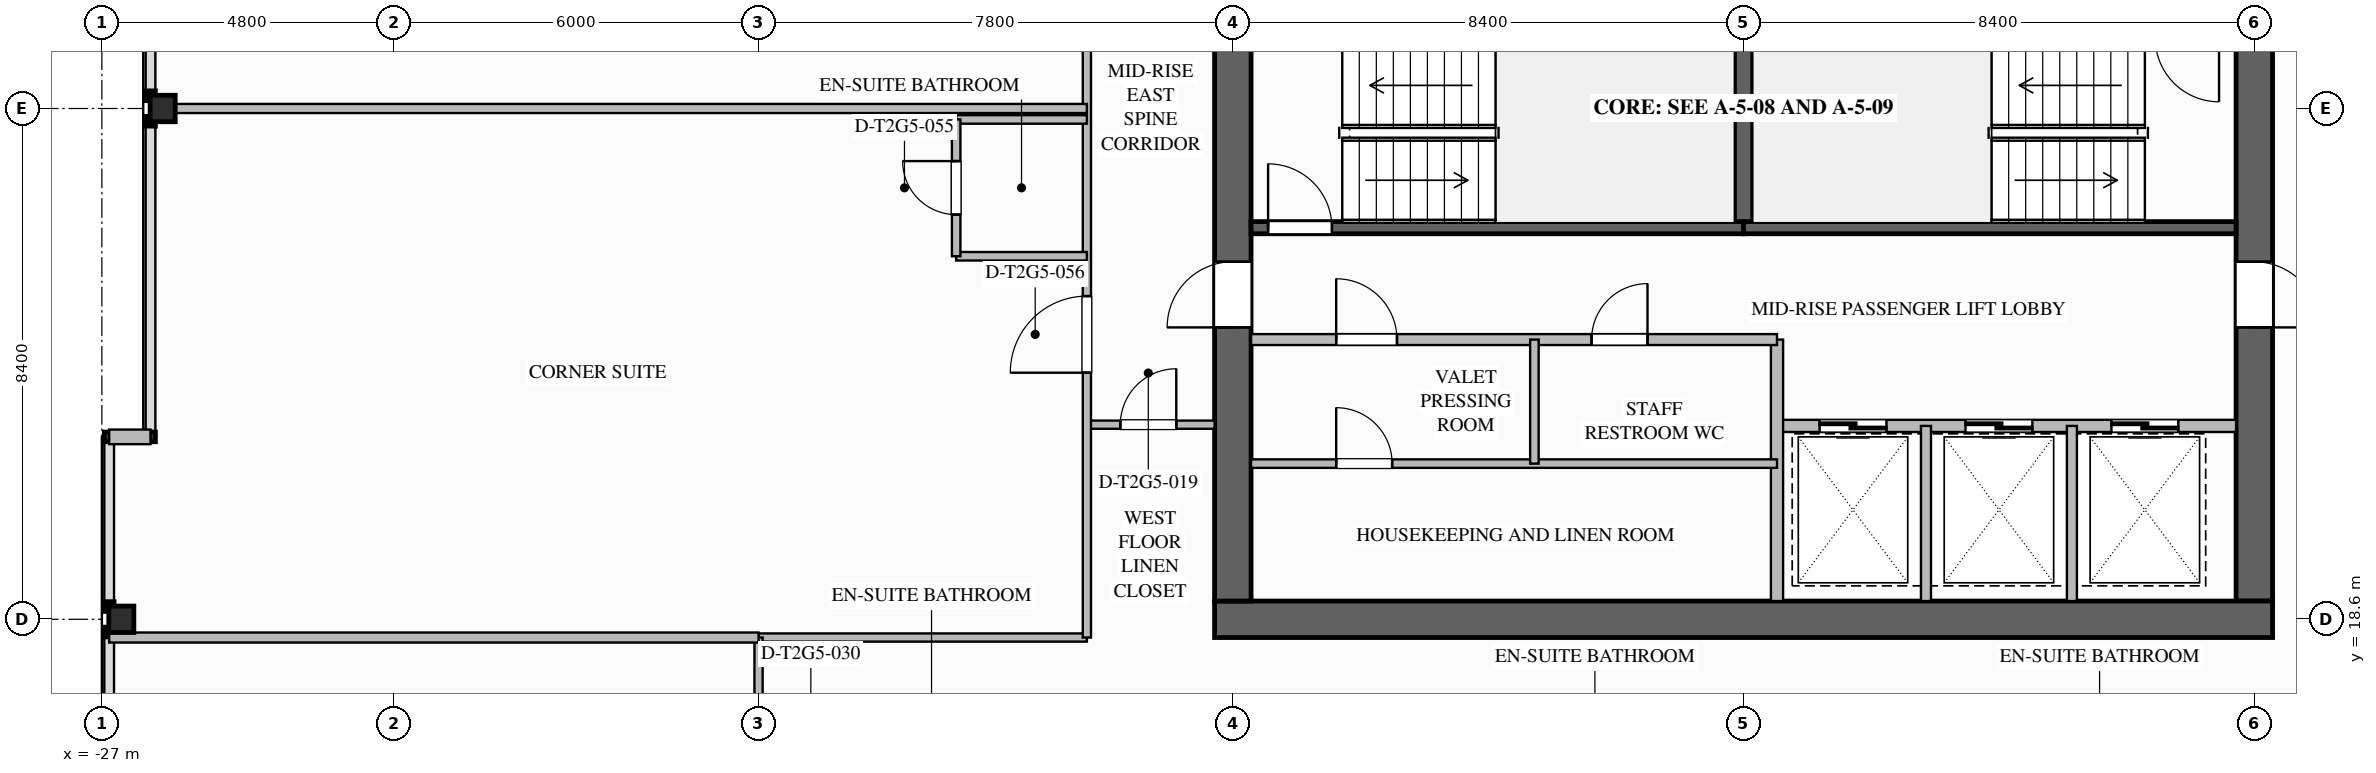
"""IFC4 building model, lengths in metres.
Left out: names, types, materials, properties, quantities, classifications, styles, units other than length and angle.
Written with IfcOpenShell. Run it as: python <this file> out.ifc"""

import sys

from ifc_helpers import new_model, si_unit, direction, frame, frame_2d, origin, origin_2d, place, context, subcontext, project, spatial, rectangle, i_section, extrude, element, fill, save


model = new_model("IFC4")
c1 = context("Model", 3, precision=1e-05, world=origin(), true_north=direction((0.0, 1.0)))
c2 = subcontext(c1, "Body", "Model", "MODEL_VIEW")
j1 = project(units=[si_unit("LENGTHUNIT", "METRE"), si_unit("PLANEANGLEUNIT", "RADIAN")], contexts=[c1])
p1 = place(None, origin())
s1 = spatial("IfcSite", under=j1, at=p1, CompositionType="ELEMENT")
p2 = place(p1, origin())
s2 = spatial("IfcBuilding", under=s1, at=p2, CompositionType="ELEMENT")
p3 = place(p2, frame((0.0, 0.0, 133.8)))
s3 = spatial("IfcBuildingStorey", under=s2, at=p3, CompositionType="ELEMENT", Elevation=133.8)
p4 = place(p3, frame((8.4, 35.1, 0.0), z_axis=(0.0, 0.0, 1.0), x_axis=(0.0, -1.0, 0.0)))
e1 = element("IfcWall", 1, at=p4, inside=s3, PredefinedType="SHEAR", context=c2, shape_type="SweptSolid", body=[
    extrude(rectangle(XDim=16.2, YDim=0.6, at=frame_2d((8.1, 0.0))), origin(), (0.0, 0.0, 1.0), 3.5),
])
p5 = place(p4, frame((3.08, 0.0, 0.0)))
e2 = element("IfcOpeningElement", 2, at=p5, cuts=e1, PredefinedType="OPENING", context=c2, shape_type="SweptSolid", body=[
    extrude(rectangle(XDim=1.12, YDim=2.1, at=frame_2d((0.56, 1.05))), frame((0.0, 0.31, 0.0), z_axis=(0.0, -1.0, 0.0), x_axis=(1.0, 0.0, 0.0)), (0.0, 0.0, 1.0), 0.62),
])
p6 = place(p4, frame((10.62, 0.0, 0.0)))
e3 = element("IfcOpeningElement", 3, at=p6, cuts=e1, PredefinedType="OPENING", context=c2, shape_type="SweptSolid", body=[
    extrude(rectangle(XDim=1.08, YDim=2.04, at=frame_2d((0.54, 1.02))), frame((0.0, 0.31, 0.0), z_axis=(0.0, -1.0, 0.0), x_axis=(1.0, 0.0, 0.0)), (0.0, 0.0, 1.0), 0.62),
])
p7 = place(p3, frame((8.7, 18.6, 0.0), z_axis=(0.0, 0.0, 1.0), x_axis=(-1.0, 0.0, 0.0)))
e4 = element("IfcWall", 4, at=p7, inside=s3, PredefinedType="SHEAR", context=c2, shape_type="SweptSolid", body=[
    extrude(rectangle(XDim=17.4, YDim=0.6, at=frame_2d((8.7, 0.0))), origin(), (0.0, 0.0, 1.0), 3.5),
])
p8 = place(p3, frame((-8.4, 18.9, 0.0), z_axis=(0.0, 0.0, 1.0), x_axis=(0.0, 1.0, 0.0)))
e5 = element("IfcWall", 5, at=p8, inside=s3, PredefinedType="SHEAR", context=c2, shape_type="SweptSolid", body=[
    extrude(rectangle(XDim=16.2, YDim=0.6, at=frame_2d((8.1, 0.0))), origin(), (0.0, 0.0, 1.0), 3.5),
])
p9 = place(p8, frame((4.5, 0.0, 0.0)))
e6 = element("IfcOpeningElement", 6, at=p9, cuts=e5, PredefinedType="OPENING", context=c2, shape_type="SweptSolid", body=[
    extrude(rectangle(XDim=1.08, YDim=2.04, at=frame_2d((0.54, 1.02))), frame((0.0, 0.31, 0.0), z_axis=(0.0, -1.0, 0.0), x_axis=(1.0, 0.0, 0.0)), (0.0, 0.0, 1.0), 0.62),
])
for number, where, z_axis, x_axis in (
    (7, (-26.68, 18.6, 0.0), (0.0, 0.0, 1.0), (1.0, 0.0, 0.0)),
    (8, (-26.0, 27.0, 0.0), (0.0, 0.0, 1.0), (1.0, 0.0, 0.0)),
):
    element("IfcColumn", number, at=place(p3, frame(where, z_axis=z_axis, x_axis=x_axis)), inside=s3, PredefinedType="COLUMN", context=c2, shape_type="SweptSolid", body=[
        extrude(i_section(OverallWidth=0.412, OverallDepth=0.435, WebThickness=0.036, FlangeThickness=0.057, FilletRadius=0.028, at=origin_2d()), origin(), (0.0, 0.0, 1.0), 3.497),
    ])
p10 = place(p3, frame((-26.88, 21.6, 0.0), z_axis=(0.0, 0.0, 1.0), x_axis=(1.0, 0.0, 0.0)))
e9 = element("IfcWall", 9, at=p10, inside=s3, PredefinedType="STANDARD", context=c2, shape_type="SweptSolid", body=[
    extrude(rectangle(XDim=0.68, YDim=0.24, at=frame_2d((0.34, 0.0))), origin(), (0.0, 0.0, 1.0), 3.24),
])
p11 = place(p3, frame((0.0, 25.04, 0.0), z_axis=(0.0, 0.0, 1.0), x_axis=(0.0, 1.0, 0.0)))
e10 = element("IfcWall", 10, at=p11, inside=s3, PredefinedType="SOLIDWALL", context=c2, shape_type="SweptSolid", body=[
    extrude(rectangle(XDim=3.12, YDim=0.3, at=frame_2d((1.56, 0.0))), origin(), (0.0, 0.0, 1.0), 3.24),
])
p12 = place(p3, frame((-8.1, 25.04, 0.0), z_axis=(0.0, 0.0, 1.0), x_axis=(1.0, 0.0, 0.0)))
e11 = element("IfcWall", 11, at=p12, inside=s3, PredefinedType="SOLIDWALL", context=c2, shape_type="SweptSolid", body=[
    extrude(rectangle(XDim=8.1, YDim=0.2, at=frame_2d((4.05, 0.0))), origin(), (0.0, 0.0, 1.0), 3.24),
])
p13 = place(p12, frame((0.28, 0.0, 0.0)))
e12 = element("IfcOpeningElement", 12, at=p13, cuts=e11, PredefinedType="OPENING", context=c2, shape_type="SweptSolid", body=[
    extrude(rectangle(XDim=1.05, YDim=2.1, at=frame_2d((0.525, 1.05))), frame((0.0, 0.11, 0.0), z_axis=(0.0, -1.0, 0.0), x_axis=(1.0, 0.0, 0.0)), (0.0, 0.0, 1.0), 0.22),
])
p14 = place(p3, frame((0.0, 25.04, 0.0), z_axis=(0.0, 0.0, 1.0), x_axis=(1.0, 0.0, 0.0)))
e13 = element("IfcWall", 13, at=p14, inside=s3, PredefinedType="SOLIDWALL", context=c2, shape_type="SweptSolid", body=[
    extrude(rectangle(XDim=8.1, YDim=0.2, at=frame_2d((4.05, 0.0))), origin(), (0.0, 0.0, 1.0), 3.24),
])
p15 = place(p3, frame((8.1, 21.78, 0.0), z_axis=(0.0, 0.0, 1.0), x_axis=(-1.0, 0.0, 0.0)))
e14 = element("IfcWall", 14, at=p15, inside=s3, PredefinedType="SOLIDWALL", context=c2, shape_type="SweptSolid", body=[
    extrude(rectangle(XDim=7.55, YDim=0.2, at=frame_2d((3.775, 0.0))), origin(), (0.0, 0.0, 1.0), 3.24),
])
p16 = place(p15, frame((5.75, 0.0, 0.0)))
e15 = element("IfcOpeningElement", 15, at=p16, cuts=e14, PredefinedType="OPENING", context=c2, shape_type="SweptSolid", body=[
    extrude(rectangle(XDim=1.1, YDim=2.2, at=frame_2d((0.55, 1.1))), frame((0.0, 0.11, 0.0), z_axis=(0.0, -1.0, 0.0), x_axis=(1.0, 0.0, 0.0)), (0.0, 0.0, 1.0), 0.22),
])
p17 = place(p15, frame((3.35, 0.0, 0.0)))
e16 = element("IfcOpeningElement", 16, at=p17, cuts=e14, PredefinedType="OPENING", context=c2, shape_type="SweptSolid", body=[
    extrude(rectangle(XDim=1.1, YDim=2.2, at=frame_2d((0.55, 1.1))), frame((0.0, 0.11, 0.0), z_axis=(0.0, -1.0, 0.0), x_axis=(1.0, 0.0, 0.0)), (0.0, 0.0, 1.0), 0.22),
])
p18 = place(p15, frame((0.95, 0.0, 0.0)))
e17 = element("IfcOpeningElement", 17, at=p18, cuts=e14, PredefinedType="OPENING", context=c2, shape_type="SweptSolid", body=[
    extrude(rectangle(XDim=1.1, YDim=2.2, at=frame_2d((0.55, 1.1))), frame((0.0, 0.11, 0.0), z_axis=(0.0, -1.0, 0.0), x_axis=(1.0, 0.0, 0.0)), (0.0, 0.0, 1.0), 0.22),
])
p19 = place(p3, frame((0.55, 18.9, 0.0), z_axis=(0.0, 0.0, 1.0), x_axis=(0.0, 1.0, 0.0)))
e18 = element("IfcWall", 18, at=p19, inside=s3, PredefinedType="SOLIDWALL", context=c2, shape_type="SweptSolid", body=[
    extrude(rectangle(XDim=4.3, YDim=0.2, at=frame_2d((2.15, 0.0))), origin(), (0.0, 0.0, 1.0), 3.24),
])
for number, where, z_axis, x_axis in (
    (19, (3.0, 18.9, 0.0), (0.0, 0.0, 1.0), (0.0, 1.0, 0.0)),
    (20, (5.4, 18.9, 0.0), (0.0, 0.0, 1.0), (0.0, 1.0, 0.0)),
):
    element("IfcWall", number, at=place(p3, frame(where, z_axis=z_axis, x_axis=x_axis)), inside=s3, PredefinedType="PARTITIONING", context=c2, shape_type="SweptSolid", body=[
        extrude(rectangle(XDim=2.88, YDim=0.165, at=frame_2d((1.44, 0.0))), origin(), (0.0, 0.0, 1.0), 3.24),
    ])
p20 = place(p3, frame((-8.1, 23.2, 0.0), z_axis=(0.0, 0.0, 1.0), x_axis=(1.0, 0.0, 0.0)))
e21 = element("IfcWall", 21, at=p20, inside=s3, PredefinedType="SOLIDWALL", context=c2, shape_type="SweptSolid", body=[
    extrude(rectangle(XDim=8.65, YDim=0.18, at=frame_2d((4.325, 0.0))), origin(), (0.0, 0.0, 1.0), 3.24),
])
p21 = place(p20, frame((1.4, 0.0, 0.0)))
e22 = element("IfcOpeningElement", 22, at=p21, cuts=e21, PredefinedType="OPENING", context=c2, shape_type="SweptSolid", body=[
    extrude(rectangle(XDim=1.0, YDim=2.1, at=frame_2d((0.5, 1.05))), frame((0.0, 0.1, 0.0), z_axis=(0.0, -1.0, 0.0), x_axis=(1.0, 0.0, 0.0)), (0.0, 0.0, 1.0), 0.2),
])
p22 = place(p20, frame((5.6, 0.0, 0.0)))
e23 = element("IfcOpeningElement", 23, at=p22, cuts=e21, PredefinedType="OPENING", context=c2, shape_type="SweptSolid", body=[
    extrude(rectangle(XDim=0.92, YDim=2.1, at=frame_2d((0.46, 1.05))), frame((0.0, 0.1, 0.0), z_axis=(0.0, -1.0, 0.0), x_axis=(1.0, 0.0, 0.0)), (0.0, 0.0, 1.0), 0.2),
])
p23 = place(p3, frame((-8.1, 21.16, 0.0), z_axis=(0.0, 0.0, 1.0), x_axis=(1.0, 0.0, 0.0)))
e24 = element("IfcWall", 24, at=p23, inside=s3, PredefinedType="PLUMBINGWALL", context=c2, shape_type="SweptSolid", body=[
    extrude(rectangle(XDim=8.65, YDim=0.14, at=frame_2d((4.325, 0.0))), origin(), (0.0, 0.0, 1.0), 3.24),
])
p24 = place(p23, frame((1.4, 0.0, 0.0)))
e25 = element("IfcOpeningElement", 25, at=p24, cuts=e24, PredefinedType="OPENING", context=c2, shape_type="SweptSolid", body=[
    extrude(rectangle(XDim=0.92, YDim=2.1, at=frame_2d((0.46, 1.05))), frame((0.0, 0.08, 0.0), z_axis=(0.0, -1.0, 0.0), x_axis=(1.0, 0.0, 0.0)), (0.0, 0.0, 1.0), 0.16),
])
p25 = place(p3, frame((-3.44, 21.16, 0.0), z_axis=(0.0, 0.0, 1.0), x_axis=(0.0, 1.0, 0.0)))
e26 = element("IfcWall", 26, at=p25, inside=s3, PredefinedType="PLUMBINGWALL", context=c2, shape_type="SweptSolid", body=[
    extrude(rectangle(XDim=2.04, YDim=0.14, at=frame_2d((1.02, 0.0))), origin(), (0.0, 0.0, 1.0), 3.24),
])
p26 = place(p3, frame((-10.8, 21.8, 0.0), z_axis=(0.0, 0.0, 1.0), x_axis=(1.0, 0.0, 0.0)))
e27 = element("IfcWall", 27, at=p26, inside=s3, PredefinedType="PARTITIONING", context=c2, shape_type="SweptSolid", body=[
    extrude(rectangle(XDim=2.1, YDim=0.135, at=frame_2d((1.05, 0.0))), origin(), (0.0, 0.0, 1.0), 3.24),
])
p27 = place(p26, frame((0.55, 0.0, 0.0)))
e28 = element("IfcOpeningElement", 28, at=p27, cuts=e27, PredefinedType="OPENING", context=c2, shape_type="SweptSolid", body=[
    extrude(rectangle(XDim=0.92, YDim=2.1, at=frame_2d((0.46, 1.05))), frame((0.0, 0.077, 0.0), z_axis=(0.0, -1.0, 0.0), x_axis=(1.0, 0.0, 0.0)), (0.0, 0.0, 1.0), 0.155),
])
p28 = place(p3, frame((-16.2, 18.3, 0.0), z_axis=(0.0, 0.0, 1.0), x_axis=(1.0, 0.0, 0.0)))
e29 = element("IfcWall", 29, at=p28, inside=s3, PredefinedType="PARTITIONING", context=c2, shape_type="SweptSolid", body=[
    extrude(rectangle(XDim=5.4, YDim=0.135, at=frame_2d((2.7, 0.0))), origin(), (0.0, 0.0, 1.0), 3.24),
])
p29 = place(p3, frame((-10.8, 18.3, 0.0), z_axis=(0.0, 0.0, 1.0), x_axis=(0.0, 1.0, 0.0)))
e30 = element("IfcWall", 30, at=p29, inside=s3, PredefinedType="PARTITIONING", context=c2, shape_type="SweptSolid", body=[
    extrude(rectangle(XDim=17.4, YDim=0.135, at=frame_2d((8.7, 0.0))), origin(), (0.0, 0.0, 1.0), 3.24),
])
p30 = place(p29, frame((4.355, 0.0, 0.0)))
e31 = element("IfcOpeningElement", 31, at=p30, cuts=e30, PredefinedType="OPENING", context=c2, shape_type="SweptSolid", body=[
    extrude(rectangle(XDim=1.26, YDim=2.2, at=frame_2d((0.63, 1.1))), frame((0.0, 0.077, 0.0), z_axis=(0.0, -1.0, 0.0), x_axis=(1.0, 0.0, 0.0)), (0.0, 0.0, 1.0), 0.155),
])
p31 = place(p29, frame((10.69, 0.0, 0.0)))
e32 = element("IfcOpeningElement", 32, at=p31, cuts=e30, PredefinedType="OPENING", context=c2, shape_type="SweptSolid", body=[
    extrude(rectangle(XDim=1.02, YDim=2.15, at=frame_2d((0.51, 1.075))), frame((0.0, 0.077, 0.0), z_axis=(0.0, -1.0, 0.0), x_axis=(1.0, 0.0, 0.0)), (0.0, 0.0, 1.0), 0.155),
])
p32 = place(p3, frame((-16.2, 15.8, 0.0), z_axis=(0.0, 0.0, 1.0), x_axis=(0.0, 1.0, 0.0)))
e33 = element("IfcWall", 33, at=p32, inside=s3, PredefinedType="PARTITIONING", context=c2, shape_type="SweptSolid", body=[
    extrude(rectangle(XDim=2.5, YDim=0.135, at=frame_2d((1.25, 0.0))), origin(), (0.0, 0.0, 1.0), 2.53),
])
p33 = place(p32, frame((0.52, 0.0, 0.0)))
e34 = element("IfcOpeningElement", 34, at=p33, cuts=e33, PredefinedType="OPENING", context=c2, shape_type="SweptSolid", body=[
    extrude(rectangle(XDim=1.02, YDim=2.15, at=frame_2d((0.51, 1.075))), frame((0.0, 0.077, 0.0), z_axis=(0.0, -1.0, 0.0), x_axis=(1.0, 0.0, 0.0)), (0.0, 0.0, 1.0), 0.155),
])
p34 = place(p3, frame((-26.88, 18.3, 0.0), z_axis=(0.0, 0.0, 1.0), x_axis=(1.0, 0.0, 0.0)))
e35 = element("IfcWall", 35, at=p34, inside=s3, PredefinedType="PARTITIONING", context=c2, shape_type="SweptSolid", body=[
    extrude(rectangle(XDim=10.68, YDim=0.165, at=frame_2d((5.34, 0.0))), origin(), (0.0, 0.0, 1.0), 2.53),
])
p35 = place(p3, frame((-26.2, 27.0, 0.0), z_axis=(0.0, 0.0, 1.0), x_axis=(1.0, 0.0, 0.0)))
e36 = element("IfcWall", 36, at=p35, inside=s3, PredefinedType="PARTITIONING", context=c2, shape_type="SweptSolid", body=[
    extrude(rectangle(XDim=15.4, YDim=0.15, at=frame_2d((7.7, 0.0))), origin(), (0.0, 0.0, 1.0), 2.53),
])
p36 = place(p3, frame((-10.8, 24.57, 0.0), z_axis=(0.0, 0.0, 1.0), x_axis=(-1.0, 0.0, 0.0)))
e37 = element("IfcWall", 37, at=p36, inside=s3, PredefinedType="PLUMBINGWALL", context=c2, shape_type="SweptSolid", body=[
    extrude(rectangle(XDim=2.15, YDim=0.14, at=frame_2d((1.075, 0.0))), origin(), (0.0, 0.0, 1.0), 3.24),
])
p37 = place(p3, frame((-10.8, 26.82, 0.0), z_axis=(0.0, 0.0, 1.0), x_axis=(-1.0, 0.0, 0.0)))
e38 = element("IfcWall", 38, at=p37, inside=s3, PredefinedType="PLUMBINGWALL", context=c2, shape_type="SweptSolid", body=[
    extrude(rectangle(XDim=2.15, YDim=0.14, at=frame_2d((1.075, 0.0))), origin(), (0.0, 0.0, 1.0), 2.617),
])
p38 = place(p3, frame((-12.95, 24.57, 0.0), z_axis=(0.0, 0.0, 1.0), x_axis=(0.0, 1.0, 0.0)))
e39 = element("IfcWall", 39, at=p38, inside=s3, PredefinedType="PLUMBINGWALL", context=c2, shape_type="SweptSolid", body=[
    extrude(rectangle(XDim=2.25, YDim=0.14, at=frame_2d((1.125, 0.0))), origin(), (0.0, 0.0, 1.0), 3.24),
])
p39 = place(p38, frame((0.685, 0.0, 0.0)))
e40 = element("IfcOpeningElement", 40, at=p39, cuts=e39, PredefinedType="OPENING", context=c2, shape_type="SweptSolid", body=[
    extrude(rectangle(XDim=0.88, YDim=2.1, at=frame_2d((0.44, 1.05))), frame((0.0, 0.08, 0.0), z_axis=(0.0, -1.0, 0.0), x_axis=(1.0, 0.0, 0.0)), (0.0, 0.0, 1.0), 0.16),
])
p40 = place(p13, origin())
e41 = element("IfcDoor", 41, at=p40, inside=s3, OperationType="SINGLE_SWING_LEFT", PredefinedType="DOOR", context=c2, shape_type="SweptSolid", body=[
    extrude(rectangle(XDim=1.05, YDim=2.1, at=frame_2d((0.525, 1.05))), frame((0.0, 0.025, 0.0), z_axis=(0.0, -1.0, 0.0), x_axis=(1.0, 0.0, 0.0)), (0.0, 0.0, 1.0), 0.05),
])
fill(e12, e41)
p41 = place(p16, origin())
e42 = element("IfcDoor", 42, at=p41, inside=s3, OperationType="SLIDING_TO_LEFT", PredefinedType="DOOR", context=c2, shape_type="SweptSolid", body=[
    extrude(rectangle(XDim=1.1, YDim=2.2, at=frame_2d((0.55, 1.1))), frame((0.0, 0.025, 0.0), z_axis=(0.0, -1.0, 0.0), x_axis=(1.0, 0.0, 0.0)), (0.0, 0.0, 1.0), 0.05),
])
fill(e15, e42)
p42 = place(p17, origin())
e43 = element("IfcDoor", 43, at=p42, inside=s3, OperationType="SLIDING_TO_LEFT", PredefinedType="DOOR", context=c2, shape_type="SweptSolid", body=[
    extrude(rectangle(XDim=1.1, YDim=2.2, at=frame_2d((0.55, 1.1))), frame((0.0, 0.025, 0.0), z_axis=(0.0, -1.0, 0.0), x_axis=(1.0, 0.0, 0.0)), (0.0, 0.0, 1.0), 0.05),
])
fill(e16, e43)
p43 = place(p18, origin())
e44 = element("IfcDoor", 44, at=p43, inside=s3, OperationType="SLIDING_TO_LEFT", PredefinedType="DOOR", context=c2, shape_type="SweptSolid", body=[
    extrude(rectangle(XDim=1.1, YDim=2.2, at=frame_2d((0.55, 1.1))), frame((0.0, 0.025, 0.0), z_axis=(0.0, -1.0, 0.0), x_axis=(1.0, 0.0, 0.0)), (0.0, 0.0, 1.0), 0.05),
])
fill(e17, e44)
p44 = place(p9, origin())
e45 = element("IfcDoor", 45, at=p44, inside=s3, OperationType="SINGLE_SWING_LEFT", PredefinedType="DOOR", context=c2, shape_type="SweptSolid", body=[
    extrude(rectangle(XDim=1.08, YDim=2.04, at=frame_2d((0.54, 1.02))), frame((0.0, 0.025, 0.0), z_axis=(0.0, -1.0, 0.0), x_axis=(1.0, 0.0, 0.0)), (0.0, 0.0, 1.0), 0.05),
])
fill(e6, e45)
p45 = place(p6, origin())
e46 = element("IfcDoor", 46, at=p45, inside=s3, OperationType="SINGLE_SWING_RIGHT", PredefinedType="DOOR", context=c2, shape_type="SweptSolid", body=[
    extrude(rectangle(XDim=1.08, YDim=2.04, at=frame_2d((0.54, 1.02))), frame((0.0, 0.025, 0.0), z_axis=(0.0, -1.0, 0.0), x_axis=(1.0, 0.0, 0.0)), (0.0, 0.0, 1.0), 0.05),
])
fill(e3, e46)
p46 = place(p21, origin())
e47 = element("IfcDoor", 47, at=p46, inside=s3, OperationType="SINGLE_SWING_LEFT", PredefinedType="DOOR", context=c2, shape_type="SweptSolid", body=[
    extrude(rectangle(XDim=1.0, YDim=2.1, at=frame_2d((0.5, 1.05))), frame((0.0, 0.025, 0.0), z_axis=(0.0, -1.0, 0.0), x_axis=(1.0, 0.0, 0.0)), (0.0, 0.0, 1.0), 0.05),
])
fill(e22, e47)
p47 = place(p22, origin())
e48 = element("IfcDoor", 48, at=p47, inside=s3, OperationType="SINGLE_SWING_RIGHT", PredefinedType="DOOR", context=c2, shape_type="SweptSolid", body=[
    extrude(rectangle(XDim=0.92, YDim=2.1, at=frame_2d((0.46, 1.05))), frame((0.0, 0.025, 0.0), z_axis=(0.0, -1.0, 0.0), x_axis=(1.0, 0.0, 0.0)), (0.0, 0.0, 1.0), 0.05),
])
fill(e23, e48)
p48 = place(p24, origin())
e49 = element("IfcDoor", 49, at=p48, inside=s3, OperationType="SINGLE_SWING_LEFT", PredefinedType="DOOR", context=c2, shape_type="SweptSolid", body=[
    extrude(rectangle(XDim=0.92, YDim=2.1, at=frame_2d((0.46, 1.05))), frame((0.0, 0.025, 0.0), z_axis=(0.0, -1.0, 0.0), x_axis=(1.0, 0.0, 0.0)), (0.0, 0.0, 1.0), 0.05),
])
fill(e25, e49)
p49 = place(p27, origin())
e50 = element("IfcDoor", 50, at=p49, inside=s3, OperationType="SINGLE_SWING_RIGHT", PredefinedType="DOOR", context=c2, shape_type="SweptSolid", body=[
    extrude(rectangle(XDim=0.92, YDim=2.1, at=frame_2d((0.46, 1.05))), frame((0.0, 0.025, 0.0), z_axis=(0.0, -1.0, 0.0), x_axis=(1.0, 0.0, 0.0)), (0.0, 0.0, 1.0), 0.05),
])
fill(e28, e50)
p50 = place(p39, origin())
e51 = element("IfcDoor", 51, at=p50, inside=s3, OperationType="SINGLE_SWING_RIGHT", PredefinedType="DOOR", context=c2, shape_type="SweptSolid", body=[
    extrude(rectangle(XDim=0.88, YDim=2.1, at=frame_2d((0.44, 1.05))), frame((0.0, 0.025, 0.0), z_axis=(0.0, -1.0, 0.0), x_axis=(1.0, 0.0, 0.0)), (0.0, 0.0, 1.0), 0.05),
])
fill(e40, e51)
p51 = place(p30, origin())
e52 = element("IfcDoor", 52, at=p51, inside=s3, OperationType="SINGLE_SWING_LEFT", PredefinedType="DOOR", context=c2, shape_type="SweptSolid", body=[
    extrude(rectangle(XDim=1.26, YDim=2.2, at=frame_2d((0.63, 1.1))), frame((0.0, 0.025, 0.0), z_axis=(0.0, -1.0, 0.0), x_axis=(1.0, 0.0, 0.0)), (0.0, 0.0, 1.0), 0.05),
])
fill(e31, e52)
save(model, sys.argv[1])
